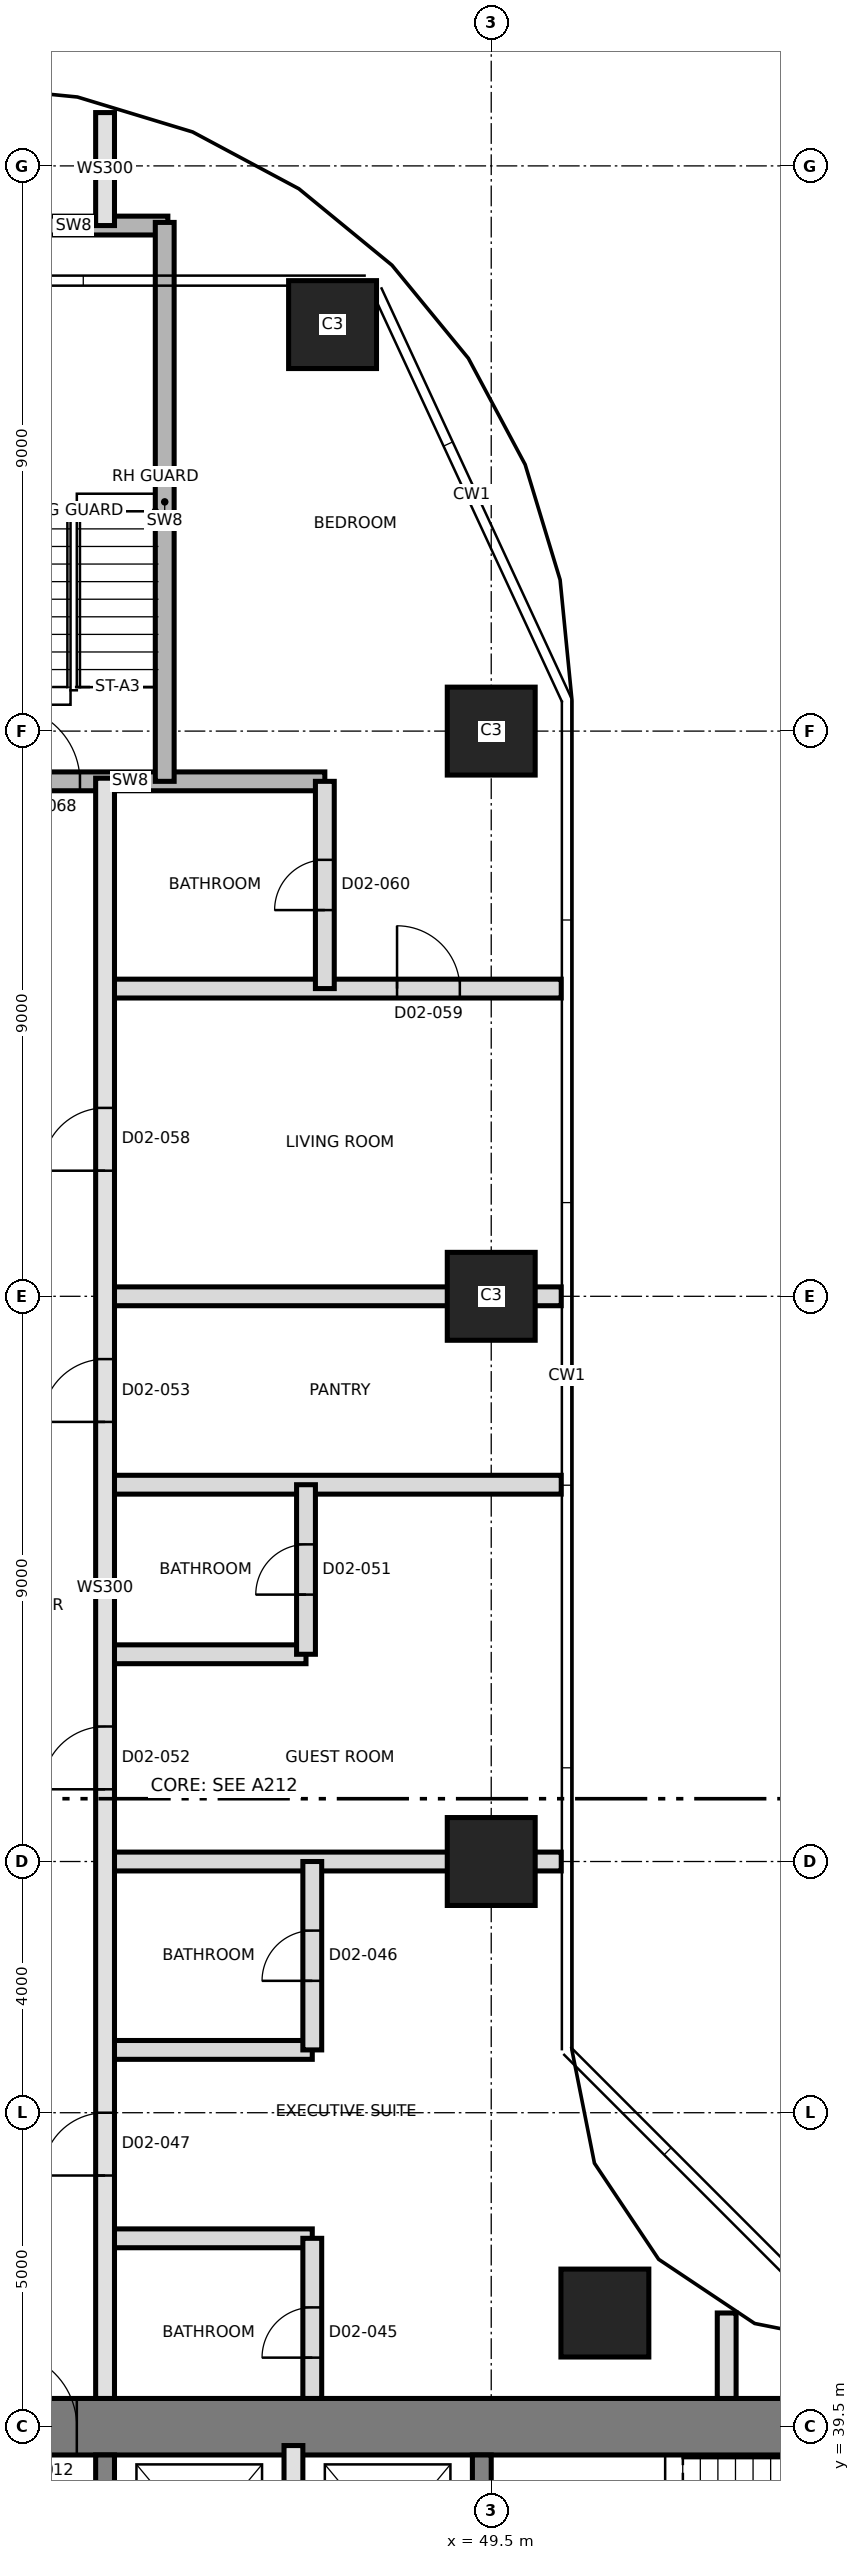
"""IFC4 building model, lengths in metres.
Left out: names, types, materials, properties, quantities, classifications, styles, units other than length and angle.
Written with IfcOpenShell. Run it as: python <this file> out.ifc"""

import sys

from ifc_helpers import new_model, si_unit, direction, frame, frame_2d, origin, origin_2d, place, context, subcontext, project, spatial, rectangle, extrude, element, fill, save


model = new_model("IFC4")
c1 = context("Model", 3, precision=1e-05, world=origin(), true_north=direction((0.0, 1.0)))
c2 = subcontext(c1, "Body", "Model", "MODEL_VIEW")
j1 = project(units=[si_unit("LENGTHUNIT", "METRE"), si_unit("PLANEANGLEUNIT", "RADIAN")], contexts=[c1])
p1 = place(None, origin())
s1 = spatial("IfcSite", under=j1, at=p1, CompositionType="ELEMENT")
p2 = place(p1, origin())
s2 = spatial("IfcBuilding", under=s1, at=p2, CompositionType="ELEMENT")
p3 = place(p2, frame((0.0, 0.0, 44.6)))
s3 = spatial("IfcBuildingStorey", under=s2, at=p3, CompositionType="ELEMENT", Elevation=44.6)
p4 = place(p3, frame((31.05, 39.5, 0.0), z_axis=(0.0, 0.0, 1.0), x_axis=(1.0, 0.0, 0.0)))
e1 = element("IfcWall", 1, at=p4, inside=s3, PredefinedType="SHEAR", context=c2, shape_type="SweptSolid", body=[
    extrude(rectangle(XDim=27.0, YDim=0.9, at=frame_2d((13.5, 0.0))), origin(), (0.0, 0.0, 1.0), 3.7),
])
p5 = place(p4, frame((10.65, 0.0, 0.0)))
e2 = element("IfcOpeningElement", 2, at=p5, cuts=e1, PredefinedType="OPENING", context=c2, shape_type="SweptSolid", body=[
    extrude(rectangle(XDim=1.2, YDim=2.1, at=frame_2d((0.6, 1.05))), frame((0.0, 0.46, 0.0), z_axis=(0.0, -1.0, 0.0), x_axis=(1.0, 0.0, 0.0)), (0.0, 0.0, 1.0), 0.92),
])
for number, where, z_axis, x_axis in (
    (3, (43.35, 33.5, 0.0), (0.0, 0.0, 1.0), (0.0, 1.0, 0.0)),
    (4, (49.35, 33.5, 0.0), (0.0, 0.0, 1.0), (0.0, 1.0, 0.0)),
):
    element("IfcWall", number, at=place(p3, frame(where, z_axis=z_axis, x_axis=x_axis)), inside=s3, PredefinedType="SHEAR", context=c2, shape_type="SweptSolid", body=[
        extrude(rectangle(XDim=5.55, YDim=0.3, at=frame_2d((2.775, 0.0))), origin(), (0.0, 0.0, 1.0), 3.7),
    ])
for number, where, z_axis, x_axis in (
    (5, (51.31, 41.31, 0.0), (0.0, 0.0, 1.0), (1.0, 0.0, 0.0)),
    (6, (49.5, 48.5, 0.0), (0.0, 0.0, 1.0), (1.0, 0.0, 0.0)),
    (7, (49.5, 57.5, 0.0), (0.0, 0.0, 1.0), (1.0, 0.0, 0.0)),
    (8, (49.5, 66.5, 0.0), (0.0, 0.0, 1.0), (1.0, 0.0, 0.0)),
    (9, (46.973, 72.973, 0.0), (0.0, 0.0, 1.0), (1.0, 0.0, 0.0)),
):
    element("IfcColumn", number, at=place(p3, frame(where, z_axis=z_axis, x_axis=x_axis)), inside=s3, PredefinedType="COLUMN", context=c2, shape_type="SweptSolid", body=[
        extrude(rectangle(XDim=1.4, YDim=1.4, at=origin_2d()), origin(), (0.0, 0.0, 1.0), 3.7),
    ])
p6 = place(p3, frame((46.35, 36.2, 0.0), z_axis=(0.0, 0.0, 1.0), x_axis=(0.0, 1.0, 0.0)))
e10 = element("IfcWall", 10, at=p6, inside=s3, PredefinedType="SOLIDWALL", context=c2, shape_type="SweptSolid", body=[
    extrude(rectangle(XDim=3.0, YDim=0.3, at=frame_2d((1.5, 0.0))), origin(), (0.0, 0.0, 1.0), 3.4),
])
for number, where, z_axis, x_axis in (
    (11, (43.35, 42.5, 0.0), (0.0, 0.0, 1.0), (1.0, 0.0, 0.0)),
    (12, (43.35, 45.5, 0.0), (0.0, 0.0, 1.0), (1.0, 0.0, 0.0)),
):
    element("IfcWall", number, at=place(p3, frame(where, z_axis=z_axis, x_axis=x_axis)), inside=s3, PredefinedType="PARTITIONING", context=c2, shape_type="SweptSolid", body=[
        extrude(rectangle(XDim=3.3, YDim=0.3, at=frame_2d((1.65, 0.0))), origin(), (0.0, 0.0, 1.0), 3.4),
    ])
p7 = place(p3, frame((43.35, 48.5, 0.0), z_axis=(0.0, 0.0, 1.0), x_axis=(1.0, 0.0, 0.0)))
e13 = element("IfcWall", 13, at=p7, inside=s3, PredefinedType="PARTITIONING", context=c2, shape_type="SweptSolid", body=[
    extrude(rectangle(XDim=7.265, YDim=0.3, at=frame_2d((3.632, 0.0))), origin(), (0.0, 0.0, 1.0), 3.4),
])
p8 = place(p3, frame((43.35, 51.8, 0.0), z_axis=(0.0, 0.0, 1.0), x_axis=(1.0, 0.0, 0.0)))
e14 = element("IfcWall", 14, at=p8, inside=s3, PredefinedType="PARTITIONING", context=c2, shape_type="SweptSolid", body=[
    extrude(rectangle(XDim=3.2, YDim=0.3, at=frame_2d((1.6, 0.0))), origin(), (0.0, 0.0, 1.0), 3.4),
])
for number, where, z_axis, x_axis in (
    (15, (43.35, 54.5, 0.0), (0.0, 0.0, 1.0), (1.0, 0.0, 0.0)),
    (16, (43.35, 57.5, 0.0), (0.0, 0.0, 1.0), (1.0, 0.0, 0.0)),
):
    element("IfcWall", number, at=place(p3, frame(where, z_axis=z_axis, x_axis=x_axis)), inside=s3, PredefinedType="PARTITIONING", context=c2, shape_type="SweptSolid", body=[
        extrude(rectangle(XDim=7.265, YDim=0.3, at=frame_2d((3.632, 0.0))), origin(), (0.0, 0.0, 1.0), 3.4),
    ])
p9 = place(p3, frame((43.35, 62.4, 0.0), z_axis=(0.0, 0.0, 1.0), x_axis=(1.0, 0.0, 0.0)))
e17 = element("IfcWall", 17, at=p9, inside=s3, PredefinedType="PARTITIONING", context=c2, shape_type="SweptSolid", body=[
    extrude(rectangle(XDim=7.265, YDim=0.3, at=frame_2d((3.632, 0.0))), origin(), (0.0, 0.0, 1.0), 3.4),
])
p10 = place(p9, frame((4.65, 0.0, 0.0)))
e18 = element("IfcOpeningElement", 18, at=p10, cuts=e17, PredefinedType="OPENING", context=c2, shape_type="SweptSolid", body=[
    extrude(rectangle(XDim=1.0, YDim=2.1, at=frame_2d((0.5, 1.05))), frame((0.0, 0.16, 0.0), z_axis=(0.0, -1.0, 0.0), x_axis=(1.0, 0.0, 0.0)), (0.0, 0.0, 1.0), 0.32),
])
p11 = place(p3, frame((40.65, 65.7, 0.0), z_axis=(0.0, 0.0, 1.0), x_axis=(1.0, 0.0, 0.0)))
e19 = element("IfcWall", 19, at=p11, inside=s3, PredefinedType="SHEAR", context=c2, shape_type="SweptSolid", body=[
    extrude(rectangle(XDim=6.2, YDim=0.3, at=frame_2d((3.1, 0.0))), origin(), (0.0, 0.0, 1.0), 3.4),
])
p12 = place(p11, frame((1.1, 0.0, 0.0)))
e20 = element("IfcOpeningElement", 20, at=p12, cuts=e19, PredefinedType="OPENING", context=c2, shape_type="SweptSolid", body=[
    extrude(rectangle(XDim=1.2, YDim=2.1, at=frame_2d((0.6, 1.05))), frame((0.0, 0.16, 0.0), z_axis=(0.0, -1.0, 0.0), x_axis=(1.0, 0.0, 0.0)), (0.0, 0.0, 1.0), 0.32),
])
p13 = place(p3, frame((41.35, 74.55, 0.0), z_axis=(0.0, 0.0, 1.0), x_axis=(1.0, 0.0, 0.0)))
e21 = element("IfcWall", 21, at=p13, inside=s3, PredefinedType="SHEAR", context=c2, shape_type="SweptSolid", body=[
    extrude(rectangle(XDim=3.0, YDim=0.3, at=frame_2d((1.5, 0.0))), origin(), (0.0, 0.0, 1.0), 3.4),
])
p14 = place(p3, frame((43.35, 39.95, 0.0), z_axis=(0.0, 0.0, 1.0), x_axis=(0.0, 1.0, 0.0)))
e22 = element("IfcWall", 22, at=p14, inside=s3, PredefinedType="SOLIDWALL", context=c2, shape_type="SweptSolid", body=[
    extrude(rectangle(XDim=25.8, YDim=0.3, at=frame_2d((12.9, 0.0))), origin(), (0.0, 0.0, 1.0), 3.4),
])
p15 = place(p14, frame((3.55, 0.0, 0.0)))
e23 = element("IfcOpeningElement", 23, at=p15, cuts=e22, PredefinedType="OPENING", context=c2, shape_type="SweptSolid", body=[
    extrude(rectangle(XDim=1.0, YDim=2.4, at=frame_2d((0.5, 1.2))), frame((0.0, 0.16, 0.0), z_axis=(0.0, -1.0, 0.0), x_axis=(1.0, 0.0, 0.0)), (0.0, 0.0, 1.0), 0.32),
])
p16 = place(p14, frame((9.7, 0.0, 0.0)))
e24 = element("IfcOpeningElement", 24, at=p16, cuts=e22, PredefinedType="OPENING", context=c2, shape_type="SweptSolid", body=[
    extrude(rectangle(XDim=1.0, YDim=2.1, at=frame_2d((0.5, 1.05))), frame((0.0, 0.16, 0.0), z_axis=(0.0, -1.0, 0.0), x_axis=(1.0, 0.0, 0.0)), (0.0, 0.0, 1.0), 0.32),
])
p17 = place(p14, frame((15.55, 0.0, 0.0)))
e25 = element("IfcOpeningElement", 25, at=p17, cuts=e22, PredefinedType="OPENING", context=c2, shape_type="SweptSolid", body=[
    extrude(rectangle(XDim=1.0, YDim=2.1, at=frame_2d((0.5, 1.05))), frame((0.0, 0.16, 0.0), z_axis=(0.0, -1.0, 0.0), x_axis=(1.0, 0.0, 0.0)), (0.0, 0.0, 1.0), 0.32),
])
p18 = place(p14, frame((19.55, 0.0, 0.0)))
e26 = element("IfcOpeningElement", 26, at=p18, cuts=e22, PredefinedType="OPENING", context=c2, shape_type="SweptSolid", body=[
    extrude(rectangle(XDim=1.0, YDim=2.4, at=frame_2d((0.5, 1.2))), frame((0.0, 0.16, 0.0), z_axis=(0.0, -1.0, 0.0), x_axis=(1.0, 0.0, 0.0)), (0.0, 0.0, 1.0), 0.32),
])
p19 = place(p3, frame((43.35, 74.55, 0.0), z_axis=(0.0, 0.0, 1.0), x_axis=(0.0, 1.0, 0.0)))
e27 = element("IfcWall", 27, at=p19, inside=s3, PredefinedType="SOLIDWALL", context=c2, shape_type="SweptSolid", body=[
    extrude(rectangle(XDim=1.799, YDim=0.3, at=frame_2d((0.899, 0.0))), origin(), (0.0, 0.0, 1.0), 3.4),
])
p20 = place(p3, frame((44.3, 65.7, 0.0), z_axis=(0.0, 0.0, 1.0), x_axis=(0.0, 1.0, 0.0)))
e28 = element("IfcWall", 28, at=p20, inside=s3, PredefinedType="SHEAR", context=c2, shape_type="SweptSolid", body=[
    extrude(rectangle(XDim=8.9, YDim=0.3, at=frame_2d((4.45, 0.0))), origin(), (0.0, 0.0, 1.0), 3.4),
])
p21 = place(p3, frame((46.55, 51.8, 0.0), z_axis=(0.0, 0.0, 1.0), x_axis=(0.0, 1.0, 0.0)))
e29 = element("IfcWall", 29, at=p21, inside=s3, PredefinedType="PARTITIONING", context=c2, shape_type="SweptSolid", body=[
    extrude(rectangle(XDim=2.7, YDim=0.3, at=frame_2d((1.35, 0.0))), origin(), (0.0, 0.0, 1.0), 3.4),
])
p22 = place(p21, frame((0.95, 0.0, 0.0)))
e30 = element("IfcOpeningElement", 30, at=p22, cuts=e29, PredefinedType="OPENING", context=c2, shape_type="SweptSolid", body=[
    extrude(rectangle(XDim=0.8, YDim=2.1, at=frame_2d((0.4, 1.05))), frame((0.0, 0.16, 0.0), z_axis=(0.0, -1.0, 0.0), x_axis=(1.0, 0.0, 0.0)), (0.0, 0.0, 1.0), 0.32),
])
p23 = place(p3, frame((46.65, 39.95, 0.0), z_axis=(0.0, 0.0, 1.0), x_axis=(0.0, 1.0, 0.0)))
e31 = element("IfcWall", 31, at=p23, inside=s3, PredefinedType="PARTITIONING", context=c2, shape_type="SweptSolid", body=[
    extrude(rectangle(XDim=2.55, YDim=0.3, at=frame_2d((1.275, 0.0))), origin(), (0.0, 0.0, 1.0), 3.4),
])
p24 = place(p23, frame((0.65, 0.0, 0.0)))
e32 = element("IfcOpeningElement", 32, at=p24, cuts=e31, PredefinedType="OPENING", context=c2, shape_type="SweptSolid", body=[
    extrude(rectangle(XDim=0.8, YDim=2.1, at=frame_2d((0.4, 1.05))), frame((0.0, 0.16, 0.0), z_axis=(0.0, -1.0, 0.0), x_axis=(1.0, 0.0, 0.0)), (0.0, 0.0, 1.0), 0.32),
])
p25 = place(p3, frame((46.65, 45.5, 0.0), z_axis=(0.0, 0.0, 1.0), x_axis=(0.0, 1.0, 0.0)))
e33 = element("IfcWall", 33, at=p25, inside=s3, PredefinedType="PARTITIONING", context=c2, shape_type="SweptSolid", body=[
    extrude(rectangle(XDim=3.0, YDim=0.3, at=frame_2d((1.5, 0.0))), origin(), (0.0, 0.0, 1.0), 3.4),
])
p26 = place(p25, frame((1.1, 0.0, 0.0)))
e34 = element("IfcOpeningElement", 34, at=p26, cuts=e33, PredefinedType="OPENING", context=c2, shape_type="SweptSolid", body=[
    extrude(rectangle(XDim=0.8, YDim=2.1, at=frame_2d((0.4, 1.05))), frame((0.0, 0.16, 0.0), z_axis=(0.0, -1.0, 0.0), x_axis=(1.0, 0.0, 0.0)), (0.0, 0.0, 1.0), 0.32),
])
p27 = place(p3, frame((46.85, 62.4, 0.0), z_axis=(0.0, 0.0, 1.0), x_axis=(0.0, 1.0, 0.0)))
e35 = element("IfcWall", 35, at=p27, inside=s3, PredefinedType="PARTITIONING", context=c2, shape_type="SweptSolid", body=[
    extrude(rectangle(XDim=3.3, YDim=0.3, at=frame_2d((1.65, 0.0))), origin(), (0.0, 0.0, 1.0), 3.4),
])
p28 = place(p27, frame((1.25, 0.0, 0.0)))
e36 = element("IfcOpeningElement", 36, at=p28, cuts=e35, PredefinedType="OPENING", context=c2, shape_type="SweptSolid", body=[
    extrude(rectangle(XDim=0.8, YDim=2.1, at=frame_2d((0.4, 1.05))), frame((0.0, 0.16, 0.0), z_axis=(0.0, -1.0, 0.0), x_axis=(1.0, 0.0, 0.0)), (0.0, 0.0, 1.0), 0.32),
])
p29 = place(p3, frame((53.25, 39.95, 0.0), z_axis=(0.0, 0.0, 1.0), x_axis=(0.0, 1.0, 0.0)))
e37 = element("IfcWall", 37, at=p29, inside=s3, PredefinedType="PARTITIONING", context=c2, shape_type="SweptSolid", body=[
    extrude(rectangle(XDim=1.361, YDim=0.3, at=frame_2d((0.681, 0.0))), origin(), (0.0, 0.0, 1.0), 3.4),
])
p30 = place(p5, origin())
e38 = element("IfcDoor", 38, at=p30, inside=s3, OperationType="SINGLE_SWING_RIGHT", PredefinedType="DOOR", context=c2, shape_type="SweptSolid", body=[
    extrude(rectangle(XDim=1.2, YDim=2.1, at=frame_2d((0.6, 1.05))), frame((0.0, 0.025, 0.0), z_axis=(0.0, -1.0, 0.0), x_axis=(1.0, 0.0, 0.0)), (0.0, 0.0, 1.0), 0.05),
])
fill(e2, e38)
p31 = place(p24, origin())
e39 = element("IfcDoor", 39, at=p31, inside=s3, OperationType="SINGLE_SWING_RIGHT", PredefinedType="DOOR", context=c2, shape_type="SweptSolid", body=[
    extrude(rectangle(XDim=0.8, YDim=2.1, at=frame_2d((0.4, 1.05))), frame((0.0, 0.025, 0.0), z_axis=(0.0, -1.0, 0.0), x_axis=(1.0, 0.0, 0.0)), (0.0, 0.0, 1.0), 0.05),
])
fill(e32, e39)
p32 = place(p26, origin())
e40 = element("IfcDoor", 40, at=p32, inside=s3, OperationType="SINGLE_SWING_LEFT", PredefinedType="DOOR", context=c2, shape_type="SweptSolid", body=[
    extrude(rectangle(XDim=0.8, YDim=2.1, at=frame_2d((0.4, 1.05))), frame((0.0, 0.025, 0.0), z_axis=(0.0, -1.0, 0.0), x_axis=(1.0, 0.0, 0.0)), (0.0, 0.0, 1.0), 0.05),
])
fill(e34, e40)
p33 = place(p15, origin())
e41 = element("IfcDoor", 41, at=p33, inside=s3, OperationType="SINGLE_SWING_LEFT", PredefinedType="DOOR", context=c2, shape_type="SweptSolid", body=[
    extrude(rectangle(XDim=1.0, YDim=2.4, at=frame_2d((0.5, 1.2))), frame((0.0, 0.025, 0.0), z_axis=(0.0, -1.0, 0.0), x_axis=(1.0, 0.0, 0.0)), (0.0, 0.0, 1.0), 0.05),
])
fill(e23, e41)
p34 = place(p22, origin())
e42 = element("IfcDoor", 42, at=p34, inside=s3, OperationType="SINGLE_SWING_RIGHT", PredefinedType="DOOR", context=c2, shape_type="SweptSolid", body=[
    extrude(rectangle(XDim=0.8, YDim=2.1, at=frame_2d((0.4, 1.05))), frame((0.0, 0.025, 0.0), z_axis=(0.0, -1.0, 0.0), x_axis=(1.0, 0.0, 0.0)), (0.0, 0.0, 1.0), 0.05),
])
fill(e30, e42)
p35 = place(p16, origin())
e43 = element("IfcDoor", 43, at=p35, inside=s3, OperationType="SINGLE_SWING_LEFT", PredefinedType="DOOR", context=c2, shape_type="SweptSolid", body=[
    extrude(rectangle(XDim=1.0, YDim=2.1, at=frame_2d((0.5, 1.05))), frame((0.0, 0.025, 0.0), z_axis=(0.0, -1.0, 0.0), x_axis=(1.0, 0.0, 0.0)), (0.0, 0.0, 1.0), 0.05),
])
fill(e24, e43)
p36 = place(p17, origin())
e44 = element("IfcDoor", 44, at=p36, inside=s3, OperationType="SINGLE_SWING_LEFT", PredefinedType="DOOR", context=c2, shape_type="SweptSolid", body=[
    extrude(rectangle(XDim=1.0, YDim=2.1, at=frame_2d((0.5, 1.05))), frame((0.0, 0.025, 0.0), z_axis=(0.0, -1.0, 0.0), x_axis=(1.0, 0.0, 0.0)), (0.0, 0.0, 1.0), 0.05),
])
fill(e25, e44)
p37 = place(p18, origin())
e45 = element("IfcDoor", 45, at=p37, inside=s3, OperationType="SINGLE_SWING_RIGHT", PredefinedType="DOOR", context=c2, shape_type="SweptSolid", body=[
    extrude(rectangle(XDim=1.0, YDim=2.4, at=frame_2d((0.5, 1.2))), frame((0.0, 0.025, 0.0), z_axis=(0.0, -1.0, 0.0), x_axis=(1.0, 0.0, 0.0)), (0.0, 0.0, 1.0), 0.05),
])
fill(e26, e45)
p38 = place(p10, origin())
e46 = element("IfcDoor", 46, at=p38, inside=s3, OperationType="SINGLE_SWING_LEFT", PredefinedType="DOOR", context=c2, shape_type="SweptSolid", body=[
    extrude(rectangle(XDim=1.0, YDim=2.1, at=frame_2d((0.5, 1.05))), frame((0.0, 0.025, 0.0), z_axis=(0.0, -1.0, 0.0), x_axis=(1.0, 0.0, 0.0)), (0.0, 0.0, 1.0), 0.05),
])
fill(e18, e46)
p39 = place(p28, origin())
e47 = element("IfcDoor", 47, at=p39, inside=s3, OperationType="SINGLE_SWING_LEFT", PredefinedType="DOOR", context=c2, shape_type="SweptSolid", body=[
    extrude(rectangle(XDim=0.8, YDim=2.1, at=frame_2d((0.4, 1.05))), frame((0.0, 0.025, 0.0), z_axis=(0.0, -1.0, 0.0), x_axis=(1.0, 0.0, 0.0)), (0.0, 0.0, 1.0), 0.05),
])
fill(e36, e47)
p40 = place(p12, origin())
e48 = element("IfcDoor", 48, at=p40, inside=s3, OperationType="SINGLE_SWING_RIGHT", PredefinedType="DOOR", context=c2, shape_type="SweptSolid", body=[
    extrude(rectangle(XDim=1.2, YDim=2.1, at=frame_2d((0.6, 1.05))), frame((0.0, 0.025, 0.0), z_axis=(0.0, -1.0, 0.0), x_axis=(1.0, 0.0, 0.0)), (0.0, 0.0, 1.0), 0.05),
])
fill(e20, e48)
save(model, sys.argv[1])
